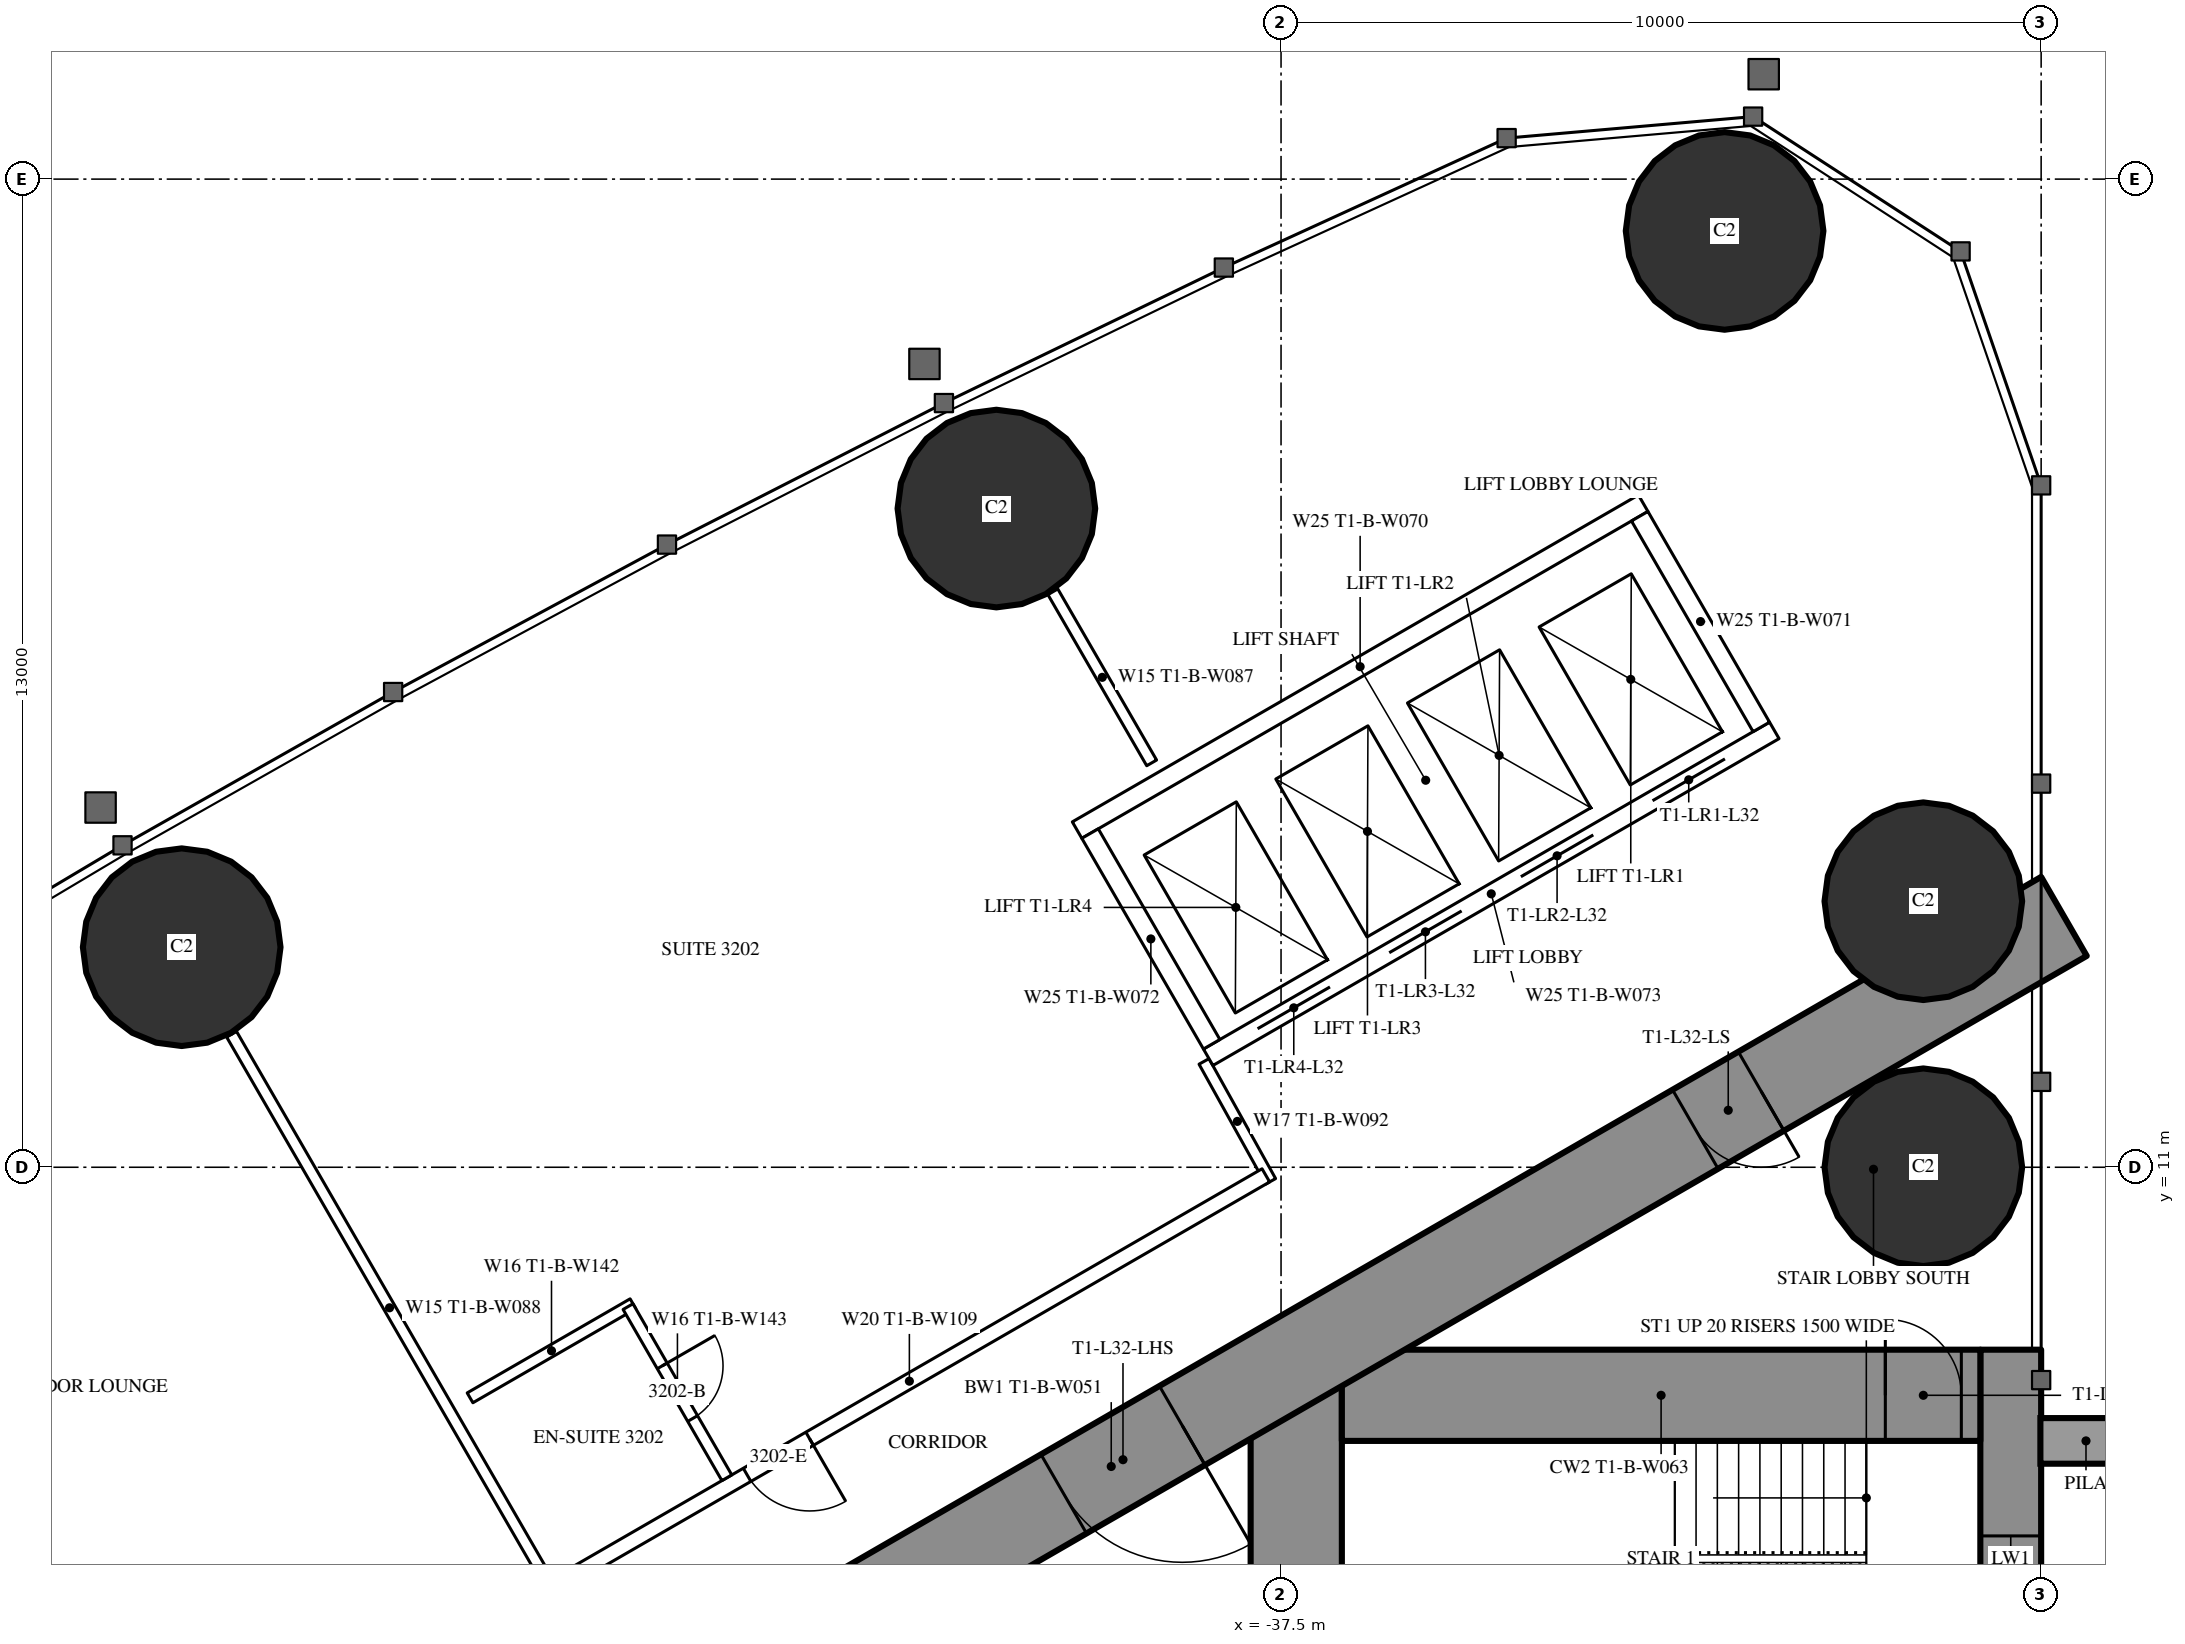
"""IFC4 building model, lengths in metres.
Left out: names, types, materials, properties, quantities, classifications, styles, units other than length and angle.
Written with IfcOpenShell. Run it as: python <this file> out.ifc"""

import sys

from ifc_helpers import new_model, si_unit, direction, frame, frame_2d, origin, origin_2d, place, context, subcontext, project, spatial, rectangle, hollow_circle, extrude, element, fill, save


model = new_model("IFC4")
c1 = context("Model", 3, precision=1e-05, world=origin(), true_north=direction((0.0, 1.0)))
c2 = subcontext(c1, "Body", "Model", "MODEL_VIEW")
j1 = project(units=[si_unit("LENGTHUNIT", "METRE"), si_unit("PLANEANGLEUNIT", "RADIAN")], contexts=[c1])
p1 = place(None, origin())
s1 = spatial("IfcSite", under=j1, at=p1, CompositionType="ELEMENT")
p2 = place(p1, origin())
s2 = spatial("IfcBuilding", under=s1, at=p2, CompositionType="ELEMENT")
p3 = place(p2, frame((0.0, 0.0, 122.1)))
s3 = spatial("IfcBuildingStorey", under=s2, at=p3, CompositionType="ELEMENT", Elevation=122.1)
for number, where, z_axis, x_axis in (
    (1, (-31.665, 23.318, 0.0), (0.0, 0.0, 1.0), (1.0, 0.0, 0.0)),
    (2, (-29.05, 11.0, 0.0), (0.0, 0.0, 1.0), (1.0, 0.0, 0.0)),
    (3, (-29.05, 14.5, 0.0), (0.0, 0.0, 1.0), (1.0, 0.0, 0.0)),
    (4, (-41.245, 19.666, 0.0), (0.0, 0.0, 1.0), (1.0, 0.0, 0.0)),
    (5, (-51.963, 13.895, 0.0), (0.0, 0.0, 1.0), (1.0, 0.0, 0.0)),
):
    element("IfcColumn", number, at=place(p3, frame(where, z_axis=z_axis, x_axis=x_axis)), inside=s3, PredefinedType="COLUMN", context=c2, shape_type="SweptSolid", body=[
        extrude(hollow_circle(Radius=1.3, WallThickness=0.1, at=origin_2d()), origin(), (0.0, 0.0, 1.0), 3.5),
    ])
p4 = place(p3, frame((-27.9, 8.6, 0.0), z_axis=(0.0, 0.0, 1.0), x_axis=(0.0, -1.0, 0.0)))
e6 = element("IfcWall", 6, at=p4, inside=s3, PredefinedType="SHEAR", context=c2, shape_type="SweptSolid", body=[
    extrude(rectangle(XDim=17.2, YDim=0.8, at=frame_2d((8.6, 0.0))), origin(), (0.0, 0.0, 1.0), 3.5),
])
p5 = place(p4, frame((2.45, 0.0, 0.6)))
e7 = element("IfcOpeningElement", 7, at=p5, cuts=e6, PredefinedType="OPENING", context=c2, shape_type="SweptSolid", body=[
    extrude(rectangle(XDim=0.6, YDim=2.1, at=frame_2d((0.3, 1.05))), frame((0.0, 0.41, 0.0), z_axis=(0.0, -1.0, 0.0), x_axis=(1.0, 0.0, 0.0)), (0.0, 0.0, 1.0), 0.82),
])
p6 = place(p4, frame((14.15, 0.0, 0.6)))
e8 = element("IfcOpeningElement", 8, at=p6, cuts=e6, PredefinedType="OPENING", context=c2, shape_type="SweptSolid", body=[
    extrude(rectangle(XDim=0.6, YDim=2.1, at=frame_2d((0.3, 1.05))), frame((0.0, 0.41, 0.0), z_axis=(0.0, -1.0, 0.0), x_axis=(1.0, 0.0, 0.0)), (0.0, 0.0, 1.0), 0.82),
])
p7 = place(p3, frame((-37.3, 8.6, 0.0), z_axis=(0.0, 0.0, 1.0), x_axis=(0.0, -1.0, 0.0)))
e9 = element("IfcWall", 9, at=p7, inside=s3, PredefinedType="SHEAR", context=c2, shape_type="SweptSolid", body=[
    extrude(rectangle(XDim=17.2, YDim=1.2, at=frame_2d((8.6, 0.0))), origin(), (0.0, 0.0, 1.0), 3.5),
])
p8 = place(p7, frame((7.7, 0.0, 0.0)))
e10 = element("IfcOpeningElement", 10, at=p8, cuts=e9, PredefinedType="OPENING", context=c2, shape_type="SweptSolid", body=[
    extrude(rectangle(XDim=1.8, YDim=2.2, at=frame_2d((0.9, 1.1))), frame((0.0, 0.61, 0.0), z_axis=(0.0, -1.0, 0.0), x_axis=(1.0, 0.0, 0.0)), (0.0, 0.0, 1.0), 1.22),
])
p9 = place(p3, frame((-28.3, 8.0, 0.0), z_axis=(0.0, 0.0, 1.0), x_axis=(-1.0, 0.0, 0.0)))
e11 = element("IfcWall", 11, at=p9, inside=s3, PredefinedType="SHEAR", context=c2, shape_type="SweptSolid", body=[
    extrude(rectangle(XDim=8.4, YDim=1.2, at=frame_2d((4.2, 0.0))), origin(), (0.0, 0.0, 1.0), 3.5),
])
p10 = place(p9, frame((0.25, 0.0, 0.0)))
e12 = element("IfcOpeningElement", 12, at=p10, cuts=e11, PredefinedType="OPENING", context=c2, shape_type="SweptSolid", body=[
    extrude(rectangle(XDim=1.0, YDim=2.2, at=frame_2d((0.5, 1.1))), frame((0.0, 0.61, 0.0), z_axis=(0.0, -1.0, 0.0), x_axis=(1.0, 0.0, 0.0)), (0.0, 0.0, 1.0), 1.22),
])
p11 = place(p3, frame((-27.2, 14.3, 0.0), z_axis=(0.0, 0.0, 1.0), x_axis=(-0.866026593062, -0.499997940104, 0.0)))
e13 = element("IfcWall", 13, at=p11, inside=s3, PredefinedType="SHEAR", context=c2, shape_type="SweptSolid", body=[
    extrude(rectangle(XDim=28.946, YDim=1.2, at=frame_2d((14.473, 0.0))), origin(), (0.0, 0.0, 1.0), 3.5),
])
p12 = place(p11, frame((4.6, 0.0, 0.0)))
e14 = element("IfcOpeningElement", 14, at=p12, cuts=e13, PredefinedType="OPENING", context=c2, shape_type="SweptSolid", body=[
    extrude(rectangle(XDim=1.0, YDim=2.2, at=frame_2d((0.5, 1.1))), frame((0.0, 0.61, 0.0), z_axis=(0.0, -1.0, 0.0), x_axis=(1.0, 0.0, 0.0)), (0.0, 0.0, 1.0), 1.22),
])
p13 = place(p11, frame((13.395, 0.0, 0.0)))
e15 = element("IfcOpeningElement", 15, at=p13, cuts=e13, PredefinedType="OPENING", context=c2, shape_type="SweptSolid", body=[
    extrude(rectangle(XDim=1.8, YDim=2.2, at=frame_2d((0.9, 1.1))), frame((0.0, 0.61, 0.0), z_axis=(0.0, -1.0, 0.0), x_axis=(1.0, 0.0, 0.0)), (0.0, 0.0, 1.0), 1.22),
])
p14 = place(p3, frame((-47.151, 5.552, 0.0), z_axis=(0.0, 0.0, 1.0), x_axis=(-0.500003012045, 0.866023664773, 0.0)))
e16 = element("IfcWall", 16, at=p14, inside=s3, PredefinedType="PARTITIONING", context=c2, shape_type="SweptSolid", body=[
    extrude(rectangle(XDim=8.311, YDim=0.15, at=frame_2d((4.156, 0.0))), origin(), (0.0, 0.0, 1.0), 2.2),
])
p15 = place(p3, frame((-39.202, 16.32, 0.0), z_axis=(0.0, 0.0, 1.0), x_axis=(-0.499947391036, 0.866055775454, 0.0)))
e17 = element("IfcWall", 17, at=p15, inside=s3, PredefinedType="PARTITIONING", context=c2, shape_type="SweptSolid", body=[
    extrude(rectangle(XDim=2.599, YDim=0.15, at=frame_2d((1.3, 0.0))), origin(), (0.0, 0.0, 1.0), 3.25),
])
p16 = place(p3, frame((-38.513, 12.392, 0.0), z_axis=(0.0, 0.0, 1.0), x_axis=(0.485585508183, -0.874189175317, 0.0)))
e18 = element("IfcWall", 18, at=p16, inside=s3, PredefinedType="PARTITIONING", context=c2, shape_type="SweptSolid", body=[
    extrude(rectangle(XDim=1.805, YDim=0.15, at=frame_2d((0.902, 0.0))), origin(), (0.0, 0.0, 1.0), 3.25),
])
p17 = place(p3, frame((-37.7, 10.894, 0.0), z_axis=(0.0, 0.0, 1.0), x_axis=(-0.866027551079, -0.499996280759, 0.0)))
e19 = element("IfcWall", 19, at=p17, inside=s3, PredefinedType="PARTITIONING", context=c2, shape_type="SweptSolid", body=[
    extrude(rectangle(XDim=10.831, YDim=0.2, at=frame_2d((5.415, 0.0))), origin(), (0.0, 0.0, 1.0), 3.25),
])
p18 = place(p17, frame((6.93, 0.0, 0.0)))
e20 = element("IfcOpeningElement", 20, at=p18, cuts=e19, PredefinedType="OPENING", context=c2, shape_type="SweptSolid", body=[
    extrude(rectangle(XDim=0.95, YDim=2.2, at=frame_2d((0.475, 1.1))), frame((0.0, 0.11, 0.0), z_axis=(0.0, -1.0, 0.0), x_axis=(1.0, 0.0, 0.0)), (0.0, 0.0, 1.0), 0.22),
])
p19 = place(p3, frame((-46.026, 9.204, 0.0), z_axis=(0.0, 0.0, 1.0), x_axis=(-0.866006523861, -0.500032699561, 0.0)))
e21 = element("IfcWall", 21, at=p19, inside=s3, PredefinedType="PARTITIONING", context=c2, shape_type="SweptSolid", body=[
    extrude(rectangle(XDim=2.475, YDim=0.15, at=frame_2d((1.237, 0.0))), origin(), (0.0, 0.0, 1.0), 3.25),
])
p20 = place(p3, frame((-44.791, 6.915, 0.0), z_axis=(0.0, 0.0, 1.0), x_axis=(-0.500047596559, 0.865997922154, 0.0)))
e22 = element("IfcWall", 22, at=p20, inside=s3, PredefinedType="PARTITIONING", context=c2, shape_type="SweptSolid", body=[
    extrude(rectangle(XDim=2.6, YDim=0.15, at=frame_2d((1.3, 0.0))), origin(), (0.0, 0.0, 1.0), 3.25),
])
p21 = place(p20, frame((0.9, 0.0, 0.0)))
e23 = element("IfcOpeningElement", 23, at=p21, cuts=e22, PredefinedType="OPENING", context=c2, shape_type="SweptSolid", body=[
    extrude(rectangle(XDim=0.8, YDim=2.2, at=frame_2d((0.4, 1.1))), frame((0.0, 0.085, 0.0), z_axis=(0.0, -1.0, 0.0), x_axis=(1.0, 0.0, 0.0)), (0.0, 0.0, 1.0), 0.17),
])
p22 = place(p3, frame((-31.01, 16.747, 0.0), z_axis=(0.0, 0.0, 1.0), x_axis=(-0.866028165386, -0.499995216735, 0.0)))
e24 = element("IfcWall", 24, at=p22, inside=s3, PredefinedType="PARTITIONING", context=c2, shape_type="SweptSolid", body=[
    extrude(rectangle(XDim=8.6, YDim=0.25, at=frame_2d((4.3, 0.0))), origin(), (0.0, 0.0, 1.0), 3.25),
])
p23 = place(p22, frame((0.75, 0.0, 0.0)))
e25 = element("IfcOpeningElement", 25, at=p23, cuts=e24, PredefinedType="OPENING", context=c2, shape_type="SweptSolid", body=[
    extrude(rectangle(XDim=1.1, YDim=2.2, at=frame_2d((0.55, 1.1))), frame((0.0, 0.135, 0.0), z_axis=(0.0, -1.0, 0.0), x_axis=(1.0, 0.0, 0.0)), (0.0, 0.0, 1.0), 0.27),
])
p24 = place(p22, frame((2.75, 0.0, 0.0)))
e26 = element("IfcOpeningElement", 26, at=p24, cuts=e24, PredefinedType="OPENING", context=c2, shape_type="SweptSolid", body=[
    extrude(rectangle(XDim=1.1, YDim=2.2, at=frame_2d((0.55, 1.1))), frame((0.0, 0.135, 0.0), z_axis=(0.0, -1.0, 0.0), x_axis=(1.0, 0.0, 0.0)), (0.0, 0.0, 1.0), 0.27),
])
p25 = place(p22, frame((4.75, 0.0, 0.0)))
e27 = element("IfcOpeningElement", 27, at=p25, cuts=e24, PredefinedType="OPENING", context=c2, shape_type="SweptSolid", body=[
    extrude(rectangle(XDim=1.1, YDim=2.2, at=frame_2d((0.55, 1.1))), frame((0.0, 0.135, 0.0), z_axis=(0.0, -1.0, 0.0), x_axis=(1.0, 0.0, 0.0)), (0.0, 0.0, 1.0), 0.27),
])
p26 = place(p22, frame((6.75, 0.0, 0.0)))
e28 = element("IfcOpeningElement", 28, at=p26, cuts=e24, PredefinedType="OPENING", context=c2, shape_type="SweptSolid", body=[
    extrude(rectangle(XDim=1.1, YDim=2.2, at=frame_2d((0.55, 1.1))), frame((0.0, 0.135, 0.0), z_axis=(0.0, -1.0, 0.0), x_axis=(1.0, 0.0, 0.0)), (0.0, 0.0, 1.0), 0.27),
])
p27 = place(p3, frame((-32.736, 19.736, 0.0), z_axis=(0.0, 0.0, 1.0), x_axis=(-0.866028165386, -0.499995216735, 0.0)))
e29 = element("IfcWall", 29, at=p27, inside=s3, PredefinedType="PARTITIONING", context=c2, shape_type="SweptSolid", body=[
    extrude(rectangle(XDim=8.6, YDim=0.25, at=frame_2d((4.3, 0.0))), origin(), (0.0, 0.0, 1.0), 3.25),
])
p28 = place(p3, frame((-31.181, 16.793, 0.0), z_axis=(0.0, 0.0, 1.0), x_axis=(-0.499929347863, 0.866066190972, 0.0)))
e30 = element("IfcWall", 30, at=p28, inside=s3, PredefinedType="PARTITIONING", context=c2, shape_type="SweptSolid", body=[
    extrude(rectangle(XDim=3.201, YDim=0.25, at=frame_2d((1.6, 0.0))), origin(), (0.0, 0.0, 1.0), 3.25),
])
p29 = place(p3, frame((-38.413, 12.618, 0.0), z_axis=(0.0, 0.0, 1.0), x_axis=(-0.499872130319, 0.866099216793, 0.0)))
e31 = element("IfcWall", 31, at=p29, inside=s3, PredefinedType="PARTITIONING", context=c2, shape_type="SweptSolid", body=[
    extrude(rectangle(XDim=3.2, YDim=0.25, at=frame_2d((1.6, 0.0))), origin(), (0.0, 0.0, 1.0), 3.25),
])
p30 = place(p21, origin())
e32 = element("IfcDoor", 32, at=p30, inside=s3, OperationType="SINGLE_SWING_RIGHT", PredefinedType="DOOR", context=c2, shape_type="SweptSolid", body=[
    extrude(rectangle(XDim=0.8, YDim=2.2, at=frame_2d((0.4, 1.1))), frame((0.0, 0.025, 0.0), z_axis=(0.0, -1.0, 0.0), x_axis=(1.0, 0.0, 0.0)), (0.0, 0.0, 1.0), 0.05),
])
fill(e23, e32)
p31 = place(p18, origin())
e33 = element("IfcDoor", 33, at=p31, inside=s3, OperationType="SINGLE_SWING_LEFT", PredefinedType="DOOR", context=c2, shape_type="SweptSolid", body=[
    extrude(rectangle(XDim=0.95, YDim=2.2, at=frame_2d((0.475, 1.1))), frame((0.0, 0.025, 0.0), z_axis=(0.0, -1.0, 0.0), x_axis=(1.0, 0.0, 0.0)), (0.0, 0.0, 1.0), 0.05),
])
fill(e20, e33)
p32 = place(p12, origin())
e34 = element("IfcDoor", 34, at=p32, inside=s3, OperationType="SINGLE_SWING_LEFT", PredefinedType="DOOR", context=c2, shape_type="SweptSolid", body=[
    extrude(rectangle(XDim=1.0, YDim=2.2, at=frame_2d((0.5, 1.1))), frame((0.0, 0.025, 0.0), z_axis=(0.0, -1.0, 0.0), x_axis=(1.0, 0.0, 0.0)), (0.0, 0.0, 1.0), 0.05),
])
fill(e14, e34)
p33 = place(p13, origin())
e35 = element("IfcDoor", 35, at=p33, inside=s3, OperationType="DOUBLE_DOOR_SINGLE_SWING", PredefinedType="DOOR", context=c2, shape_type="SweptSolid", body=[
    extrude(rectangle(XDim=1.8, YDim=2.2, at=frame_2d((0.9, 1.1))), frame((0.0, 0.025, 0.0), z_axis=(0.0, -1.0, 0.0), x_axis=(1.0, 0.0, 0.0)), (0.0, 0.0, 1.0), 0.05),
])
fill(e15, e35)
p34 = place(p10, origin())
e36 = element("IfcDoor", 36, at=p34, inside=s3, OperationType="SINGLE_SWING_RIGHT", PredefinedType="DOOR", context=c2, shape_type="SweptSolid", body=[
    extrude(rectangle(XDim=1.0, YDim=2.2, at=frame_2d((0.5, 1.1))), frame((0.0, 0.025, 0.0), z_axis=(0.0, -1.0, 0.0), x_axis=(1.0, 0.0, 0.0)), (0.0, 0.0, 1.0), 0.05),
])
fill(e12, e36)
p35 = place(p23, origin())
e37 = element("IfcDoor", 37, at=p35, inside=s3, OperationType="DOUBLE_DOOR_SLIDING", PredefinedType="USERDEFINED", context=c2, shape_type="SweptSolid", body=[
    extrude(rectangle(XDim=1.1, YDim=2.2, at=frame_2d((0.55, 1.1))), frame((0.0, 0.025, 0.0), z_axis=(0.0, -1.0, 0.0), x_axis=(1.0, 0.0, 0.0)), (0.0, 0.0, 1.0), 0.05),
])
fill(e25, e37)
p36 = place(p24, origin())
e38 = element("IfcDoor", 38, at=p36, inside=s3, OperationType="DOUBLE_DOOR_SLIDING", PredefinedType="USERDEFINED", context=c2, shape_type="SweptSolid", body=[
    extrude(rectangle(XDim=1.1, YDim=2.2, at=frame_2d((0.55, 1.1))), frame((0.0, 0.025, 0.0), z_axis=(0.0, -1.0, 0.0), x_axis=(1.0, 0.0, 0.0)), (0.0, 0.0, 1.0), 0.05),
])
fill(e26, e38)
p37 = place(p25, origin())
e39 = element("IfcDoor", 39, at=p37, inside=s3, OperationType="DOUBLE_DOOR_SLIDING", PredefinedType="USERDEFINED", context=c2, shape_type="SweptSolid", body=[
    extrude(rectangle(XDim=1.1, YDim=2.2, at=frame_2d((0.55, 1.1))), frame((0.0, 0.025, 0.0), z_axis=(0.0, -1.0, 0.0), x_axis=(1.0, 0.0, 0.0)), (0.0, 0.0, 1.0), 0.05),
])
fill(e27, e39)
p38 = place(p26, origin())
e40 = element("IfcDoor", 40, at=p38, inside=s3, OperationType="DOUBLE_DOOR_SLIDING", PredefinedType="USERDEFINED", context=c2, shape_type="SweptSolid", body=[
    extrude(rectangle(XDim=1.1, YDim=2.2, at=frame_2d((0.55, 1.1))), frame((0.0, 0.025, 0.0), z_axis=(0.0, -1.0, 0.0), x_axis=(1.0, 0.0, 0.0)), (0.0, 0.0, 1.0), 0.05),
])
fill(e28, e40)
p39 = place(p5, origin())
e41 = element("IfcWindow", 41, at=p39, inside=s3, PartitioningType="SINGLE_PANEL", PredefinedType="WINDOW", context=c2, shape_type="SweptSolid", body=[
    extrude(rectangle(XDim=0.6, YDim=2.1, at=frame_2d((0.3, 1.05))), frame((0.0, 0.03, 0.0), z_axis=(0.0, -1.0, 0.0), x_axis=(1.0, 0.0, 0.0)), (0.0, 0.0, 1.0), 0.06),
])
fill(e7, e41)
save(model, sys.argv[1])
